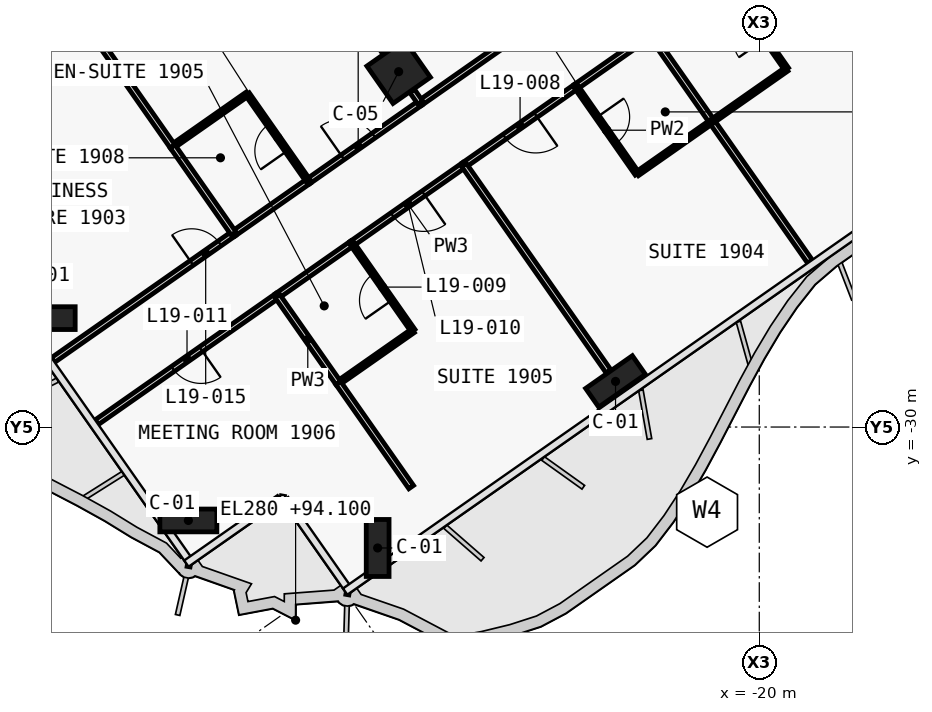
"""IFC4 building model, lengths in metres.
Left out: names, types, materials, properties, quantities, classifications, styles, units other than length and angle.
Written with IfcOpenShell. Run it as: python <this file> out.ifc"""

import sys

from ifc_helpers import new_model, si_unit, direction, frame, frame_2d, origin, origin_2d, place, context, subcontext, project, spatial, rectangle, extrude, clip, halfspace, element, fill, save


model = new_model("IFC4")
c1 = context("Model", 3, precision=1e-05, world=origin(), true_north=direction((0.0, 1.0)))
c2 = subcontext(c1, "Body", "Model", "MODEL_VIEW")
j1 = project(units=[si_unit("LENGTHUNIT", "METRE"), si_unit("PLANEANGLEUNIT", "RADIAN")], contexts=[c1])
p1 = place(None, origin())
s1 = spatial("IfcSite", under=j1, at=p1, CompositionType="ELEMENT")
p2 = place(p1, origin())
s2 = spatial("IfcBuilding", under=s1, at=p2, CompositionType="ELEMENT")
p3 = place(p2, frame((0.0, 0.0, 94.1)))
s3 = spatial("IfcBuildingStorey", under=s2, at=p3, CompositionType="ELEMENT", Elevation=94.1)
p4 = place(p3, frame((-23.782, -28.799, 0.0), z_axis=(0.0, 0.0, 1.0), x_axis=(-0.819152044289, -0.573576436351, 0.0)))
e1 = element("IfcColumn", 1, at=p4, inside=s3, PredefinedType="COLUMN", context=c2, shape_type="SweptSolid", body=[
    extrude(rectangle(XDim=1.5, YDim=0.6, at=origin_2d()), origin(), (0.0, 0.0, 1.0), 3.6),
])
p5 = place(p3, frame((-30.336, -33.388, 0.0), z_axis=(0.502949209434, 0.352179537956, 0.789310880309), x_axis=(-0.646559152129, -0.45273936053, 0.613993757481)))
e2 = element("IfcColumn", 2, at=p5, inside=s3, PredefinedType="COLUMN", context=c2, shape_type="Clipping", body=[
    clip(clip(extrude(rectangle(XDim=1.5, YDim=0.6, at=origin_2d()), origin(), (0.0, 0.0, 1.0), 4.561), halfspace(frame((0.0, 0.0, 0.583), z_axis=(0.0, 0.0, 1.0), x_axis=(1.0, 0.0, 0.0)), True)), halfspace(frame((0.0, 0.0, 3.977), z_axis=(0.0, 0.0, 1.0), x_axis=(1.0, 0.0, 0.0)), False)),
])
for number, where, z_axis, x_axis in (
    (3, (-35.141, -32.541, 0.0), (0.503, 0.352, 0.789), (-0.574, 0.819, 0.0)),
    (4, (-38.869, -27.216, 0.0), (0.503, 0.352, 0.789), (-0.574, 0.819, 0.0)),
):
    element("IfcColumn", number, at=place(p3, frame(where, z_axis=z_axis, x_axis=x_axis)), inside=s3, PredefinedType="COLUMN", context=c2, shape_type="Clipping", body=[
        clip(clip(extrude(rectangle(XDim=1.5, YDim=0.6, at=origin_2d()), origin(), (0.0, 0.0, 1.0), 4.561), halfspace(frame((0.0, 0.0, 0.233), z_axis=(0.0, 0.0, 1.0), x_axis=(1.0, 0.0, 0.0)), True)), halfspace(frame((0.0, 0.0, 4.327), z_axis=(0.0, 0.0, 1.0), x_axis=(1.0, 0.0, 0.0)), False)),
    ])
p6 = place(p3, frame((-29.49, -20.649, 0.0), z_axis=(0.0, 0.0, 1.0), x_axis=(-0.819152044289, -0.573576436351, 0.0)))
e5 = element("IfcColumn", 5, at=p6, inside=s3, PredefinedType="COLUMN", context=c2, shape_type="SweptSolid", body=[
    extrude(rectangle(XDim=1.2, YDim=1.2, at=origin_2d()), origin(), (0.0, 0.0, 1.0), 3.6),
])
p7 = place(p3, frame((-28.917, -21.469, 0.0), z_axis=(0.0, 0.0, 1.0), x_axis=(0.819152599934, 0.573575642807, 0.0)))
e6 = element("IfcWall", 6, at=p7, inside=s3, PredefinedType="PARTITIONING", context=c2, shape_type="SweptSolid", body=[
    extrude(rectangle(XDim=8.098, YDim=0.15, at=frame_2d((4.049, 0.0))), origin(), (0.0, 0.0, 1.0), 2.6),
])
p8 = place(p7, frame((3.599, 0.0, 0.0)))
e7 = element("IfcOpeningElement", 7, at=p8, cuts=e6, PredefinedType="OPENING", context=c2, shape_type="SweptSolid", body=[
    extrude(rectangle(XDim=0.9, YDim=2.1, at=frame_2d((0.45, 1.05))), frame((0.0, 0.085, 0.0), z_axis=(0.0, -1.0, 0.0), x_axis=(1.0, 0.0, 0.0)), (0.0, 0.0, 1.0), 0.17),
])
p9 = place(p3, frame((-31.866, -23.533, 0.0), z_axis=(0.0, 0.0, 1.0), x_axis=(0.819145961204, 0.573585123798, 0.0)))
e8 = element("IfcWall", 8, at=p9, inside=s3, PredefinedType="PARTITIONING", context=c2, shape_type="SweptSolid", body=[
    extrude(rectangle(XDim=3.603, YDim=0.15, at=frame_2d((1.802, 0.0))), origin(), (0.0, 0.0, 1.0), 2.6),
])
p10 = place(p9, frame((1.101, 0.0, 0.0)))
e9 = element("IfcOpeningElement", 9, at=p10, cuts=e8, PredefinedType="OPENING", context=c2, shape_type="SweptSolid", body=[
    extrude(rectangle(XDim=1.0, YDim=2.1, at=frame_2d((0.5, 1.05))), frame((0.0, 0.085, 0.0), z_axis=(0.0, -1.0, 0.0), x_axis=(1.0, 0.0, 0.0)), (0.0, 0.0, 1.0), 0.17),
])
p11 = place(p3, frame((-33.833, -24.91, 0.0), z_axis=(0.0, 0.0, 1.0), x_axis=(0.819146032251, 0.573585022335, 0.0)))
e10 = element("IfcWall", 10, at=p11, inside=s3, PredefinedType="PARTITIONING", context=c2, shape_type="SweptSolid", body=[
    extrude(rectangle(XDim=2.404, YDim=0.15, at=frame_2d((1.202, 0.0))), origin(), (0.0, 0.0, 1.0), 3.32),
])
p12 = place(p3, frame((-38.582, -28.236, 0.0), z_axis=(0.0, 0.0, 1.0), x_axis=(0.819150860942, 0.573578126342, 0.0)))
e11 = element("IfcWall", 11, at=p12, inside=s3, PredefinedType="PARTITIONING", context=c2, shape_type="SweptSolid", body=[
    extrude(rectangle(XDim=5.802, YDim=0.15, at=frame_2d((2.901, 0.0))), origin(), (0.0, 0.0, 1.0), 2.5),
])
p13 = place(p12, frame((4.451, 0.0, 0.0)))
e12 = element("IfcOpeningElement", 12, at=p13, cuts=e11, PredefinedType="OPENING", context=c2, shape_type="SweptSolid", body=[
    extrude(rectangle(XDim=0.9, YDim=2.1, at=frame_2d((0.45, 1.05))), frame((0.0, 0.085, 0.0), z_axis=(0.0, -1.0, 0.0), x_axis=(1.0, 0.0, 0.0)), (0.0, 0.0, 1.0), 0.17),
])
p14 = place(p3, frame((-24.819, -21.041, 0.0), z_axis=(0.0, 0.0, 1.0), x_axis=(-0.819145961204, -0.573585123798, 0.0)))
e13 = element("IfcWall", 13, at=p14, inside=s3, PredefinedType="PARTITIONING", context=c2, shape_type="SweptSolid", body=[
    extrude(rectangle(XDim=3.603, YDim=0.15, at=frame_2d((1.802, 0.0))), origin(), (0.0, 0.0, 1.0), 2.6),
])
p15 = place(p14, frame((1.301, 0.0, 0.0)))
e14 = element("IfcOpeningElement", 14, at=p15, cuts=e13, PredefinedType="OPENING", context=c2, shape_type="SweptSolid", body=[
    extrude(rectangle(XDim=1.0, YDim=2.1, at=frame_2d((0.5, 1.05))), frame((0.0, 0.085, 0.0), z_axis=(0.0, -1.0, 0.0), x_axis=(1.0, 0.0, 0.0)), (0.0, 0.0, 1.0), 0.17),
])
p16 = place(p3, frame((-22.852, -19.664, 0.0), z_axis=(0.0, 0.0, 1.0), x_axis=(-0.81911261637, -0.573632741136, 0.0)))
e15 = element("IfcWall", 15, at=p16, inside=s3, PredefinedType="PARTITIONING", context=c2, shape_type="SweptSolid", body=[
    extrude(rectangle(XDim=2.404, YDim=0.15, at=frame_2d((1.202, 0.0))), origin(), (0.0, 0.0, 1.0), 3.32),
])
p17 = place(p3, frame((-27.767, -23.105, 0.0), z_axis=(0.0, 0.0, 1.0), x_axis=(-0.819145961204, -0.573585123798, 0.0)))
e16 = element("IfcWall", 16, at=p17, inside=s3, PredefinedType="PARTITIONING", context=c2, shape_type="SweptSolid", body=[
    extrude(rectangle(XDim=3.603, YDim=0.15, at=frame_2d((1.802, 0.0))), origin(), (0.0, 0.0, 1.0), 2.6),
])
p18 = place(p17, frame((1.302, 0.0, 0.0)))
e17 = element("IfcOpeningElement", 17, at=p18, cuts=e16, PredefinedType="OPENING", context=c2, shape_type="SweptSolid", body=[
    extrude(rectangle(XDim=1.0, YDim=2.1, at=frame_2d((0.5, 1.05))), frame((0.0, 0.085, 0.0), z_axis=(0.0, -1.0, 0.0), x_axis=(1.0, 0.0, 0.0)), (0.0, 0.0, 1.0), 0.17),
])
p19 = place(p3, frame((-30.716, -25.17, 0.0), z_axis=(0.0, 0.0, 1.0), x_axis=(-0.819146032251, -0.573585022335, 0.0)))
e18 = element("IfcWall", 18, at=p19, inside=s3, PredefinedType="PARTITIONING", context=c2, shape_type="SweptSolid", body=[
    extrude(rectangle(XDim=2.404, YDim=0.15, at=frame_2d((1.202, 0.0))), origin(), (0.0, 0.0, 1.0), 3.32),
])
p20 = place(p3, frame((-32.682, -26.546, 0.0), z_axis=(0.0, 0.0, 1.0), x_axis=(-0.819144934209, -0.573586590463, 0.0)))
e19 = element("IfcWall", 19, at=p20, inside=s3, PredefinedType="PARTITIONING", context=c2, shape_type="SweptSolid", body=[
    extrude(rectangle(XDim=5.802, YDim=0.15, at=frame_2d((2.901, 0.0))), origin(), (0.0, 0.0, 1.0), 2.5),
])
p21 = place(p20, frame((2.451, 0.0, 0.0)))
e20 = element("IfcOpeningElement", 20, at=p21, cuts=e19, PredefinedType="OPENING", context=c2, shape_type="SweptSolid", body=[
    extrude(rectangle(XDim=0.9, YDim=2.1, at=frame_2d((0.45, 1.05))), frame((0.0, 0.085, 0.0), z_axis=(0.0, -1.0, 0.0), x_axis=(1.0, 0.0, 0.0)), (0.0, 0.0, 1.0), 0.17),
])
p22 = place(p3, frame((-28.916, -21.468, 0.0), z_axis=(0.0, 0.0, 1.0), x_axis=(-0.572944929411, 0.819593867633, 0.0)))
e21 = element("IfcWall", 21, at=p22, inside=s3, PredefinedType="PARTITIONING", context=c2, shape_type="SweptSolid", body=[
    extrude(rectangle(XDim=0.38, YDim=0.15, at=frame_2d((0.19, 0.0))), origin(), (0.0, 0.0, 1.0), 2.6),
])
p23 = place(p3, frame((-29.845, -20.141, 0.0), z_axis=(0.0, 0.0, 1.0), x_axis=(-0.573558725113, 0.819164445546, 0.0)))
e22 = element("IfcWall", 22, at=p23, inside=s3, PredefinedType="PARTITIONING", context=c2, shape_type="SweptSolid", body=[
    extrude(rectangle(XDim=9.01, YDim=0.15, at=frame_2d((4.505, 0.0))), origin(), (0.0, 0.0, 1.0), 2.6),
])
p24 = place(p3, frame((-31.864, -23.532, 0.0), z_axis=(0.0, 0.0, 1.0), x_axis=(-0.573550118428, 0.819170471667, 0.0)))
e23 = element("IfcWall", 23, at=p24, inside=s3, PredefinedType="PARTITIONING", context=c2, shape_type="SweptSolid", body=[
    extrude(rectangle(XDim=2.8, YDim=0.12, at=frame_2d((1.4, 0.0))), origin(), (0.0, 0.0, 1.0), 2.6),
])
p25 = place(p24, frame((0.975, 0.0, 0.0)))
e24 = element("IfcOpeningElement", 24, at=p25, cuts=e23, PredefinedType="OPENING", context=c2, shape_type="SweptSolid", body=[
    extrude(rectangle(XDim=0.85, YDim=2.05, at=frame_2d((0.425, 1.025))), frame((0.0, 0.07, 0.0), z_axis=(0.0, -1.0, 0.0), x_axis=(1.0, 0.0, 0.0)), (0.0, 0.0, 1.0), 0.14),
])
p26 = place(p3, frame((-33.471, -21.238, 0.0), z_axis=(0.0, 0.0, 1.0), x_axis=(-0.819141114317, -0.573592045652, 0.0)))
e25 = element("IfcWall", 25, at=p26, inside=s3, PredefinedType="PARTITIONING", context=c2, shape_type="SweptSolid", body=[
    extrude(rectangle(XDim=2.4, YDim=0.12, at=frame_2d((1.2, 0.0))), origin(), (0.0, 0.0, 1.0), 3.32),
])
p27 = place(p3, frame((-35.438, -22.615, 0.0), z_axis=(0.0, 0.0, 1.0), x_axis=(-0.573553832693, 0.819167871076, 0.0)))
e26 = element("IfcWall", 26, at=p27, inside=s3, PredefinedType="PARTITIONING", context=c2, shape_type="SweptSolid", body=[
    extrude(rectangle(XDim=7.343, YDim=0.15, at=frame_2d((3.671, 0.0))), origin(), (0.0, 0.0, 1.0), 3.32),
])
p28 = place(p3, frame((-33.831, -24.909, 0.0), z_axis=(0.0, 0.0, 1.0), x_axis=(-0.573550118428, 0.819170471667, 0.0)))
e27 = element("IfcWall", 27, at=p28, inside=s3, PredefinedType="PARTITIONING", context=c2, shape_type="SweptSolid", body=[
    extrude(rectangle(XDim=2.8, YDim=0.15, at=frame_2d((1.4, 0.0))), origin(), (0.0, 0.0, 1.0), 2.6),
])
p29 = place(p3, frame((-21.247, -21.959, 0.0), z_axis=(0.0, 0.0, 1.0), x_axis=(0.819141114317, 0.573592045652, 0.0)))
e28 = element("IfcWall", 28, at=p29, inside=s3, PredefinedType="PARTITIONING", context=c2, shape_type="SweptSolid", body=[
    extrude(rectangle(XDim=2.4, YDim=0.12, at=frame_2d((1.2, 0.0))), origin(), (0.0, 0.0, 1.0), 3.32),
])
p30 = place(p3, frame((-19.281, -20.581, 0.0), z_axis=(0.0, 0.0, 1.0), x_axis=(-0.573550118428, 0.819170471667, 0.0)))
e29 = element("IfcWall", 29, at=p30, inside=s3, PredefinedType="PARTITIONING", context=c2, shape_type="SweptSolid", body=[
    extrude(rectangle(XDim=2.8, YDim=0.12, at=frame_2d((1.4, 0.0))), origin(), (0.0, 0.0, 1.0), 3.32),
])
p31 = place(p30, frame((0.975, 0.0, 0.0)))
e30 = element("IfcOpeningElement", 30, at=p31, cuts=e29, PredefinedType="OPENING", context=c2, shape_type="SweptSolid", body=[
    extrude(rectangle(XDim=0.85, YDim=2.05, at=frame_2d((0.425, 1.025))), frame((0.0, 0.07, 0.0), z_axis=(0.0, -1.0, 0.0), x_axis=(1.0, 0.0, 0.0)), (0.0, 0.0, 1.0), 0.14),
])
p32 = place(p3, frame((-18.667, -25.645, 0.0), z_axis=(0.0, 0.0, 1.0), x_axis=(-0.573589807488, 0.819142681555, 0.0)))
e31 = element("IfcWall", 31, at=p32, inside=s3, PredefinedType="PARTITIONING", context=c2, shape_type="SweptSolid", body=[
    extrude(rectangle(XDim=4.499, YDim=0.15, at=frame_2d((2.25, 0.0))), origin(), (0.0, 0.0, 1.0), 2.5),
])
p33 = place(p3, frame((-21.248, -21.958, 0.0), z_axis=(0.0, 0.0, 1.0), x_axis=(-0.573550118428, 0.819170471667, 0.0)))
e32 = element("IfcWall", 32, at=p33, inside=s3, PredefinedType="PARTITIONING", context=c2, shape_type="SweptSolid", body=[
    extrude(rectangle(XDim=2.8, YDim=0.15, at=frame_2d((1.4, 0.0))), origin(), (0.0, 0.0, 1.0), 3.32),
])
p34 = place(p3, frame((-24.821, -21.042, 0.0), z_axis=(0.0, 0.0, 1.0), x_axis=(0.573591086599, -0.819141785879, 0.0)))
e33 = element("IfcWall", 33, at=p34, inside=s3, PredefinedType="PARTITIONING", context=c2, shape_type="SweptSolid", body=[
    extrude(rectangle(XDim=2.8, YDim=0.12, at=frame_2d((1.4, 0.0))), origin(), (0.0, 0.0, 1.0), 3.32),
])
p35 = place(p34, frame((0.975, 0.0, 0.0)))
e34 = element("IfcOpeningElement", 34, at=p35, cuts=e33, PredefinedType="OPENING", context=c2, shape_type="SweptSolid", body=[
    extrude(rectangle(XDim=0.85, YDim=2.05, at=frame_2d((0.425, 1.025))), frame((0.0, 0.07, 0.0), z_axis=(0.0, -1.0, 0.0), x_axis=(1.0, 0.0, 0.0)), (0.0, 0.0, 1.0), 0.14),
])
p36 = place(p3, frame((-23.213, -23.336, 0.0), z_axis=(0.0, 0.0, 1.0), x_axis=(0.819155442668, 0.573571582932, 0.0)))
e35 = element("IfcWall", 35, at=p36, inside=s3, PredefinedType="PARTITIONING", context=c2, shape_type="SweptSolid", body=[
    extrude(rectangle(XDim=2.4, YDim=0.12, at=frame_2d((1.2, 0.0))), origin(), (0.0, 0.0, 1.0), 3.32),
])
p37 = place(p3, frame((-23.966, -28.537, 0.0), z_axis=(0.0, 0.0, 1.0), x_axis=(-0.57359826181, 0.819136761505, 0.0)))
e36 = element("IfcWall", 36, at=p37, inside=s3, PredefinedType="PARTITIONING", context=c2, shape_type="SweptSolid", body=[
    extrude(rectangle(XDim=6.63, YDim=0.15, at=frame_2d((3.315, 0.0))), origin(), (0.0, 0.0, 1.0), 2.6),
])
p38 = place(p3, frame((-31.077, -28.842, 0.0), z_axis=(0.0, 0.0, 1.0), x_axis=(0.819188907105, 0.573523787192, 0.0)))
e37 = element("IfcWall", 37, at=p38, inside=s3, PredefinedType="PARTITIONING", context=c2, shape_type="SweptSolid", body=[
    extrude(rectangle(XDim=2.4, YDim=0.12, at=frame_2d((1.2, 0.0))), origin(), (0.0, 0.0, 1.0), 3.32),
])
p39 = place(p3, frame((-29.111, -27.464, 0.0), z_axis=(0.0, 0.0, 1.0), x_axis=(-0.573550118428, 0.819170471667, 0.0)))
e38 = element("IfcWall", 38, at=p39, inside=s3, PredefinedType="PARTITIONING", context=c2, shape_type="SweptSolid", body=[
    extrude(rectangle(XDim=2.8, YDim=0.12, at=frame_2d((1.4, 0.0))), origin(), (0.0, 0.0, 1.0), 3.32),
])
p40 = place(p39, frame((0.975, 0.0, 0.0)))
e39 = element("IfcOpeningElement", 39, at=p40, cuts=e38, PredefinedType="OPENING", context=c2, shape_type="SweptSolid", body=[
    extrude(rectangle(XDim=0.85, YDim=2.05, at=frame_2d((0.425, 1.025))), frame((0.0, 0.07, 0.0), z_axis=(0.0, -1.0, 0.0), x_axis=(1.0, 0.0, 0.0)), (0.0, 0.0, 1.0), 0.14),
])
p41 = place(p3, frame((-29.16, -31.58, 0.0), z_axis=(0.0, 0.0, 1.0), x_axis=(-0.57358488866, 0.819146125853, 0.0)))
e40 = element("IfcWall", 40, at=p41, inside=s3, PredefinedType="PARTITIONING", context=c2, shape_type="SweptSolid", body=[
    extrude(rectangle(XDim=3.343, YDim=0.15, at=frame_2d((1.671, 0.0))), origin(), (0.0, 0.0, 1.0), 3.32),
])
p42 = place(p3, frame((-31.078, -28.841, 0.0), z_axis=(0.0, 0.0, 1.0), x_axis=(-0.573550118428, 0.819170471667, 0.0)))
e41 = element("IfcWall", 41, at=p42, inside=s3, PredefinedType="PARTITIONING", context=c2, shape_type="SweptSolid", body=[
    extrude(rectangle(XDim=2.8, YDim=0.15, at=frame_2d((1.4, 0.0))), origin(), (0.0, 0.0, 1.0), 3.32),
])
p43 = place(p35, origin())
e42 = element("IfcDoor", 42, at=p43, inside=s3, OperationType="SINGLE_SWING_LEFT", PredefinedType="DOOR", context=c2, shape_type="SweptSolid", body=[
    extrude(rectangle(XDim=0.85, YDim=2.05, at=frame_2d((0.425, 1.025))), frame((0.0, 0.025, 0.0), z_axis=(0.0, -1.0, 0.0), x_axis=(1.0, 0.0, 0.0)), (0.0, 0.0, 1.0), 0.05),
])
fill(e34, e42)
p44 = place(p15, origin())
e43 = element("IfcDoor", 43, at=p44, inside=s3, OperationType="SINGLE_SWING_RIGHT", PredefinedType="DOOR", context=c2, shape_type="SweptSolid", body=[
    extrude(rectangle(XDim=1.0, YDim=2.1, at=frame_2d((0.5, 1.05))), frame((0.0, 0.025, 0.0), z_axis=(0.0, -1.0, 0.0), x_axis=(1.0, 0.0, 0.0)), (0.0, 0.0, 1.0), 0.05),
])
fill(e14, e43)
p45 = place(p40, origin())
e44 = element("IfcDoor", 44, at=p45, inside=s3, OperationType="SINGLE_SWING_LEFT", PredefinedType="DOOR", context=c2, shape_type="SweptSolid", body=[
    extrude(rectangle(XDim=0.85, YDim=2.05, at=frame_2d((0.425, 1.025))), frame((0.0, 0.025, 0.0), z_axis=(0.0, -1.0, 0.0), x_axis=(1.0, 0.0, 0.0)), (0.0, 0.0, 1.0), 0.05),
])
fill(e39, e44)
p46 = place(p18, origin())
e45 = element("IfcDoor", 45, at=p46, inside=s3, OperationType="SINGLE_SWING_RIGHT", PredefinedType="DOOR", context=c2, shape_type="SweptSolid", body=[
    extrude(rectangle(XDim=1.0, YDim=2.1, at=frame_2d((0.5, 1.05))), frame((0.0, 0.025, 0.0), z_axis=(0.0, -1.0, 0.0), x_axis=(1.0, 0.0, 0.0)), (0.0, 0.0, 1.0), 0.05),
])
fill(e17, e45)
p47 = place(p21, origin())
e46 = element("IfcDoor", 46, at=p47, inside=s3, OperationType="SINGLE_SWING_RIGHT", PredefinedType="DOOR", context=c2, shape_type="SweptSolid", body=[
    extrude(rectangle(XDim=0.9, YDim=2.1, at=frame_2d((0.45, 1.05))), frame((0.0, 0.025, 0.0), z_axis=(0.0, -1.0, 0.0), x_axis=(1.0, 0.0, 0.0)), (0.0, 0.0, 1.0), 0.05),
])
fill(e20, e46)
p48 = place(p25, origin())
e47 = element("IfcDoor", 47, at=p48, inside=s3, OperationType="SINGLE_SWING_LEFT", PredefinedType="DOOR", context=c2, shape_type="SweptSolid", body=[
    extrude(rectangle(XDim=0.85, YDim=2.05, at=frame_2d((0.425, 1.025))), frame((0.0, 0.025, 0.0), z_axis=(0.0, -1.0, 0.0), x_axis=(1.0, 0.0, 0.0)), (0.0, 0.0, 1.0), 0.05),
])
fill(e24, e47)
p49 = place(p10, origin())
e48 = element("IfcDoor", 48, at=p49, inside=s3, OperationType="SINGLE_SWING_RIGHT", PredefinedType="DOOR", context=c2, shape_type="SweptSolid", body=[
    extrude(rectangle(XDim=1.0, YDim=2.1, at=frame_2d((0.5, 1.05))), frame((0.0, 0.025, 0.0), z_axis=(0.0, -1.0, 0.0), x_axis=(1.0, 0.0, 0.0)), (0.0, 0.0, 1.0), 0.05),
])
fill(e9, e48)
p50 = place(p13, origin())
e49 = element("IfcDoor", 49, at=p50, inside=s3, OperationType="SINGLE_SWING_RIGHT", PredefinedType="DOOR", context=c2, shape_type="SweptSolid", body=[
    extrude(rectangle(XDim=0.9, YDim=2.1, at=frame_2d((0.45, 1.05))), frame((0.0, 0.025, 0.0), z_axis=(0.0, -1.0, 0.0), x_axis=(1.0, 0.0, 0.0)), (0.0, 0.0, 1.0), 0.05),
])
fill(e12, e49)
save(model, sys.argv[1])
